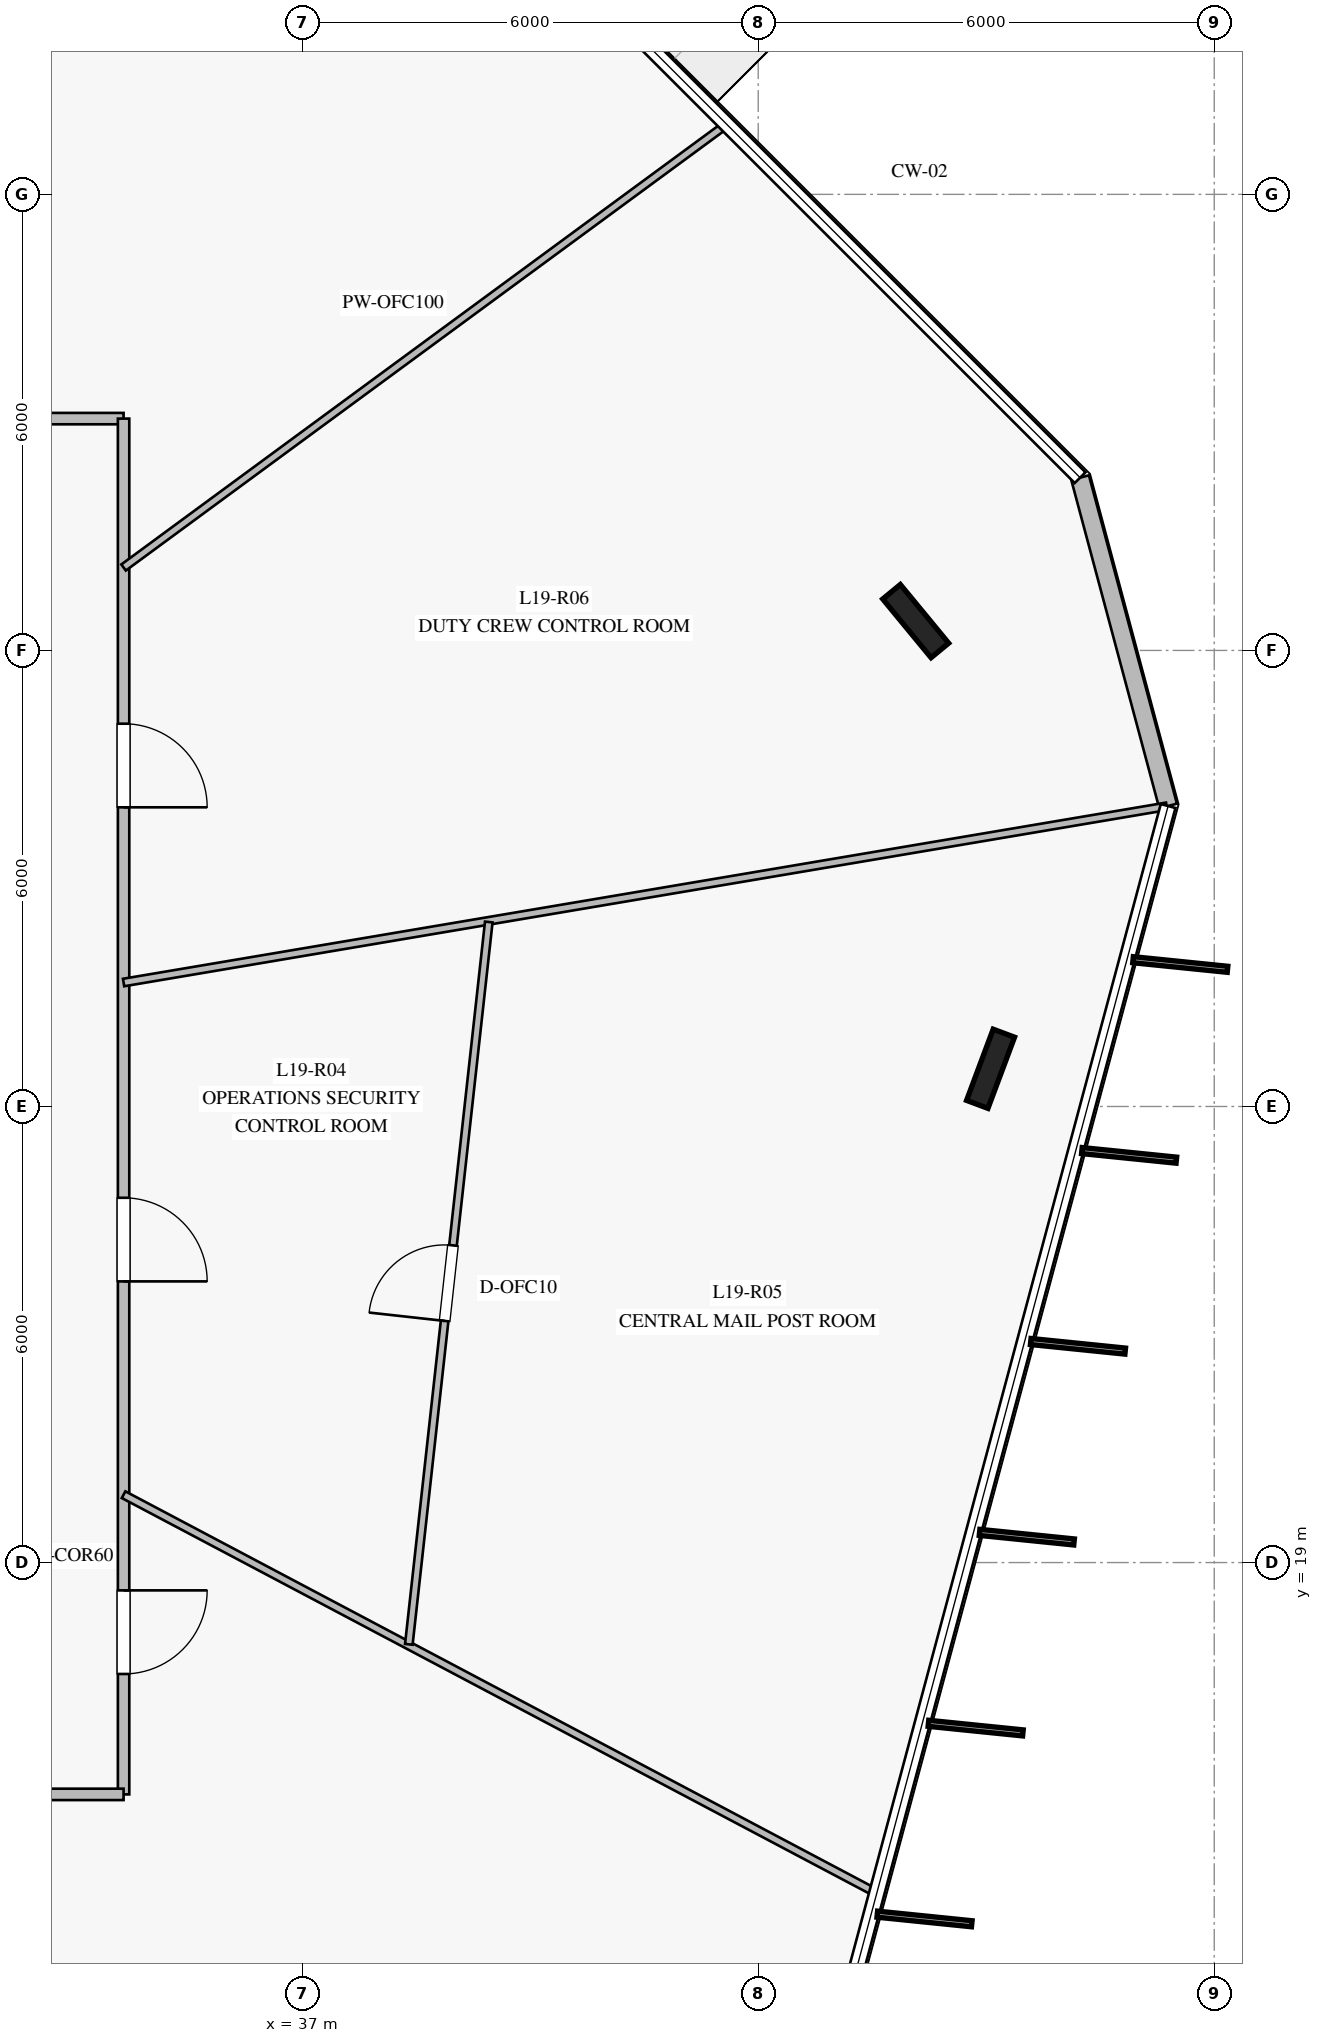
"""IFC4 building model, lengths in metres.
Left out: names, types, materials, properties, quantities, classifications, styles, units other than length and angle.
Written with IfcOpenShell. Run it as: python <this file> out.ifc"""

import sys

from ifc_helpers import new_model, si_unit, direction, frame, frame_2d, origin, origin_2d, place, context, subcontext, project, spatial, rectangle, i_section, extrude, element, fill, save


model = new_model("IFC4")
c1 = context("Model", 3, precision=1e-05, world=origin(), true_north=direction((0.0, 1.0)))
c2 = subcontext(c1, "Body", "Model", "MODEL_VIEW")
j1 = project(units=[si_unit("LENGTHUNIT", "METRE"), si_unit("PLANEANGLEUNIT", "RADIAN")], contexts=[c1])
p1 = place(None, origin())
s1 = spatial("IfcSite", under=j1, at=p1, CompositionType="ELEMENT")
p2 = place(p1, origin())
s2 = spatial("IfcBuilding", under=s1, at=p2, CompositionType="ELEMENT")
p3 = place(p2, frame((0.0, 0.0, 80.0)))
s3 = spatial("IfcBuildingStorey", under=s2, at=p3, CompositionType="ELEMENT", Elevation=80.0)
for number, where, z_axis, x_axis in (
    (1, (45.072, 31.386, 0.0), (0.0, 0.0, 1.0), (-0.636, 0.772, 0.0)),
    (2, (46.057, 25.496, 0.0), (0.0, 0.0, 1.0), (0.35, 0.937, 0.0)),
):
    element("IfcColumn", number, at=place(p3, frame(where, z_axis=z_axis, x_axis=x_axis)), inside=s3, PredefinedType="COLUMN", context=c2, shape_type="SweptSolid", body=[
        extrude(i_section(OverallWidth=0.3, OverallDepth=1.0, WebThickness=0.019, FlangeThickness=0.036, at=origin_2d()), origin(), (0.0, 0.0, 1.0), 4.0),
    ])
p4 = place(p3, frame((48.393, 28.953, 0.0), z_axis=(0.0, 0.0, 1.0), x_axis=(-0.258902519869, 0.965903455427, 0.0)))
e3 = element("IfcWall", 3, at=p4, inside=s3, PredefinedType="STANDARD", context=c2, shape_type="SweptSolid", body=[
    extrude(rectangle(XDim=4.473, YDim=0.24, at=frame_2d((2.236, 0.0))), origin(), (0.0, 0.0, 1.0), 3.76),
])
p5 = place(p3, frame((15.35, 34.05, 0.0), z_axis=(0.0, 0.0, 1.0), x_axis=(1.0, 0.0, 0.0)))
e4 = element("IfcWall", 4, at=p5, inside=s3, PredefinedType="PARTITIONING", context=c2, shape_type="SweptSolid", body=[
    extrude(rectangle(XDim=19.3, YDim=0.15, at=frame_2d((9.65, 0.0))), origin(), (0.0, 0.0, 1.0), 3.21),
])
p6 = place(p5, frame((13.573, 0.0, 0.0)))
e5 = element("IfcOpeningElement", 5, at=p6, cuts=e4, PredefinedType="OPENING", context=c2, shape_type="SweptSolid", body=[
    extrude(rectangle(XDim=1.1, YDim=2.2, at=frame_2d((0.55, 1.1))), frame((0.0, 0.085, 0.0), z_axis=(0.0, -1.0, 0.0), x_axis=(1.0, 0.0, 0.0)), (0.0, 0.0, 1.0), 0.17),
])
p7 = place(p5, frame((5.066, 0.0, 0.0)))
e6 = element("IfcOpeningElement", 6, at=p7, cuts=e4, PredefinedType="OPENING", context=c2, shape_type="SweptSolid", body=[
    extrude(rectangle(XDim=1.1, YDim=2.2, at=frame_2d((0.55, 1.1))), frame((0.0, 0.085, 0.0), z_axis=(0.0, -1.0, 0.0), x_axis=(1.0, 0.0, 0.0)), (0.0, 0.0, 1.0), 0.17),
])
p8 = place(p3, frame((34.65, 34.05, 0.0), z_axis=(0.0, 0.0, 1.0), x_axis=(0.0, -1.0, 0.0)))
e7 = element("IfcWall", 7, at=p8, inside=s3, PredefinedType="PARTITIONING", context=c2, shape_type="SweptSolid", body=[
    extrude(rectangle(XDim=18.1, YDim=0.15, at=frame_2d((9.05, 0.0))), origin(), (0.0, 0.0, 1.0), 3.21),
])
p9 = place(p8, frame((15.416, 0.0, 0.0)))
e8 = element("IfcOpeningElement", 8, at=p9, cuts=e7, PredefinedType="OPENING", context=c2, shape_type="SweptSolid", body=[
    extrude(rectangle(XDim=1.1, YDim=2.2, at=frame_2d((0.55, 1.1))), frame((0.0, 0.085, 0.0), z_axis=(0.0, -1.0, 0.0), x_axis=(1.0, 0.0, 0.0)), (0.0, 0.0, 1.0), 0.17),
])
p10 = place(p8, frame((10.251, 0.0, 0.0)))
e9 = element("IfcOpeningElement", 9, at=p10, cuts=e7, PredefinedType="OPENING", context=c2, shape_type="SweptSolid", body=[
    extrude(rectangle(XDim=1.1, YDim=2.2, at=frame_2d((0.55, 1.1))), frame((0.0, 0.085, 0.0), z_axis=(0.0, -1.0, 0.0), x_axis=(1.0, 0.0, 0.0)), (0.0, 0.0, 1.0), 0.17),
])
p11 = place(p8, frame((4.014, 0.0, 0.0)))
e10 = element("IfcOpeningElement", 10, at=p11, cuts=e7, PredefinedType="OPENING", context=c2, shape_type="SweptSolid", body=[
    extrude(rectangle(XDim=1.1, YDim=2.2, at=frame_2d((0.55, 1.1))), frame((0.0, 0.085, 0.0), z_axis=(0.0, -1.0, 0.0), x_axis=(1.0, 0.0, 0.0)), (0.0, 0.0, 1.0), 0.17),
])
p12 = place(p3, frame((34.65, 15.95, 0.0), z_axis=(0.0, 0.0, 1.0), x_axis=(-1.0, 0.0, 0.0)))
e11 = element("IfcWall", 11, at=p12, inside=s3, PredefinedType="PARTITIONING", context=c2, shape_type="SweptSolid", body=[
    extrude(rectangle(XDim=19.3, YDim=0.15, at=frame_2d((9.65, 0.0))), origin(), (0.0, 0.0, 1.0), 3.21),
])
p13 = place(p12, frame((17.013, 0.0, 0.0)))
e12 = element("IfcOpeningElement", 12, at=p13, cuts=e11, PredefinedType="OPENING", context=c2, shape_type="SweptSolid", body=[
    extrude(rectangle(XDim=1.1, YDim=2.2, at=frame_2d((0.55, 1.1))), frame((0.0, 0.085, 0.0), z_axis=(0.0, -1.0, 0.0), x_axis=(1.0, 0.0, 0.0)), (0.0, 0.0, 1.0), 0.17),
])
p14 = place(p12, frame((11.951, 0.0, 0.0)))
e13 = element("IfcOpeningElement", 13, at=p14, cuts=e11, PredefinedType="OPENING", context=c2, shape_type="SweptSolid", body=[
    extrude(rectangle(XDim=1.1, YDim=2.2, at=frame_2d((0.55, 1.1))), frame((0.0, 0.085, 0.0), z_axis=(0.0, -1.0, 0.0), x_axis=(1.0, 0.0, 0.0)), (0.0, 0.0, 1.0), 0.17),
])
p15 = place(p3, frame((34.65, 32.091, 0.0), z_axis=(0.0, 0.0, 1.0), x_axis=(0.805812397502, 0.592170904412, 0.0)))
e14 = element("IfcWall", 14, at=p15, inside=s3, PredefinedType="MOVABLE", context=c2, shape_type="SweptSolid", body=[
    extrude(rectangle(XDim=9.83, YDim=0.1, at=frame_2d((4.915, 0.0))), origin(), (0.0, 0.0, 1.0), 3.05),
])
p16 = place(p3, frame((34.65, 19.893, 0.0), z_axis=(0.0, 0.0, 1.0), x_axis=(0.883895590045, -0.467684280149, 0.0)))
e15 = element("IfcWall", 15, at=p16, inside=s3, PredefinedType="MOVABLE", context=c2, shape_type="SweptSolid", body=[
    extrude(rectangle(XDim=11.194, YDim=0.1, at=frame_2d((5.597, 0.0))), origin(), (0.0, 0.0, 1.0), 3.06),
])
p17 = place(p3, frame((34.65, 26.631, 0.0), z_axis=(0.0, 0.0, 1.0), x_axis=(0.986036061015, 0.16653193801, 0.0)))
e16 = element("IfcWall", 16, at=p17, inside=s3, PredefinedType="MOVABLE", context=c2, shape_type="SweptSolid", body=[
    extrude(rectangle(XDim=13.918, YDim=0.1, at=frame_2d((6.959, 0.0))), origin(), (0.0, 0.0, 1.0), 3.06),
])
p18 = place(p3, frame((38.403, 17.924, 0.0), z_axis=(0.0, 0.0, 1.0), x_axis=(0.110030740607, 0.99392818459, 0.0)))
e17 = element("IfcWall", 17, at=p18, inside=s3, PredefinedType="MOVABLE", context=c2, shape_type="SweptSolid", body=[
    extrude(rectangle(XDim=9.561, YDim=0.1, at=frame_2d((4.781, 0.0))), origin(), (0.0, 0.0, 1.0), 3.76),
])
p19 = place(p18, frame((4.281, 0.0, 0.0)))
e18 = element("IfcOpeningElement", 18, at=p19, cuts=e17, PredefinedType="OPENING", context=c2, shape_type="SweptSolid", body=[
    extrude(rectangle(XDim=1.0, YDim=2.15, at=frame_2d((0.5, 1.075))), frame((0.0, 0.06, 0.0), z_axis=(0.0, -1.0, 0.0), x_axis=(1.0, 0.0, 0.0)), (0.0, 0.0, 1.0), 0.12),
])
p20 = place(p9, origin())
e19 = element("IfcDoor", 19, at=p20, inside=s3, OperationType="SINGLE_SWING_LEFT", PredefinedType="DOOR", context=c2, shape_type="SweptSolid", body=[
    extrude(rectangle(XDim=1.1, YDim=2.2, at=frame_2d((0.55, 1.1))), frame((0.0, 0.025, 0.0), z_axis=(0.0, -1.0, 0.0), x_axis=(1.0, 0.0, 0.0)), (0.0, 0.0, 1.0), 0.05),
])
fill(e8, e19)
p21 = place(p10, origin())
e20 = element("IfcDoor", 20, at=p21, inside=s3, OperationType="SINGLE_SWING_RIGHT", PredefinedType="DOOR", context=c2, shape_type="SweptSolid", body=[
    extrude(rectangle(XDim=1.1, YDim=2.2, at=frame_2d((0.55, 1.1))), frame((0.0, 0.025, 0.0), z_axis=(0.0, -1.0, 0.0), x_axis=(1.0, 0.0, 0.0)), (0.0, 0.0, 1.0), 0.05),
])
fill(e9, e20)
p22 = place(p19, origin())
e21 = element("IfcDoor", 21, at=p22, inside=s3, OperationType="SINGLE_SWING_LEFT", PredefinedType="DOOR", context=c2, shape_type="SweptSolid", body=[
    extrude(rectangle(XDim=1.0, YDim=2.15, at=frame_2d((0.5, 1.075))), frame((0.0, 0.025, 0.0), z_axis=(0.0, -1.0, 0.0), x_axis=(1.0, 0.0, 0.0)), (0.0, 0.0, 1.0), 0.05),
])
fill(e18, e21)
p23 = place(p11, origin())
e22 = element("IfcDoor", 22, at=p23, inside=s3, OperationType="SINGLE_SWING_RIGHT", PredefinedType="DOOR", context=c2, shape_type="SweptSolid", body=[
    extrude(rectangle(XDim=1.1, YDim=2.2, at=frame_2d((0.55, 1.1))), frame((0.0, 0.025, 0.0), z_axis=(0.0, -1.0, 0.0), x_axis=(1.0, 0.0, 0.0)), (0.0, 0.0, 1.0), 0.05),
])
fill(e10, e22)
save(model, sys.argv[1])
